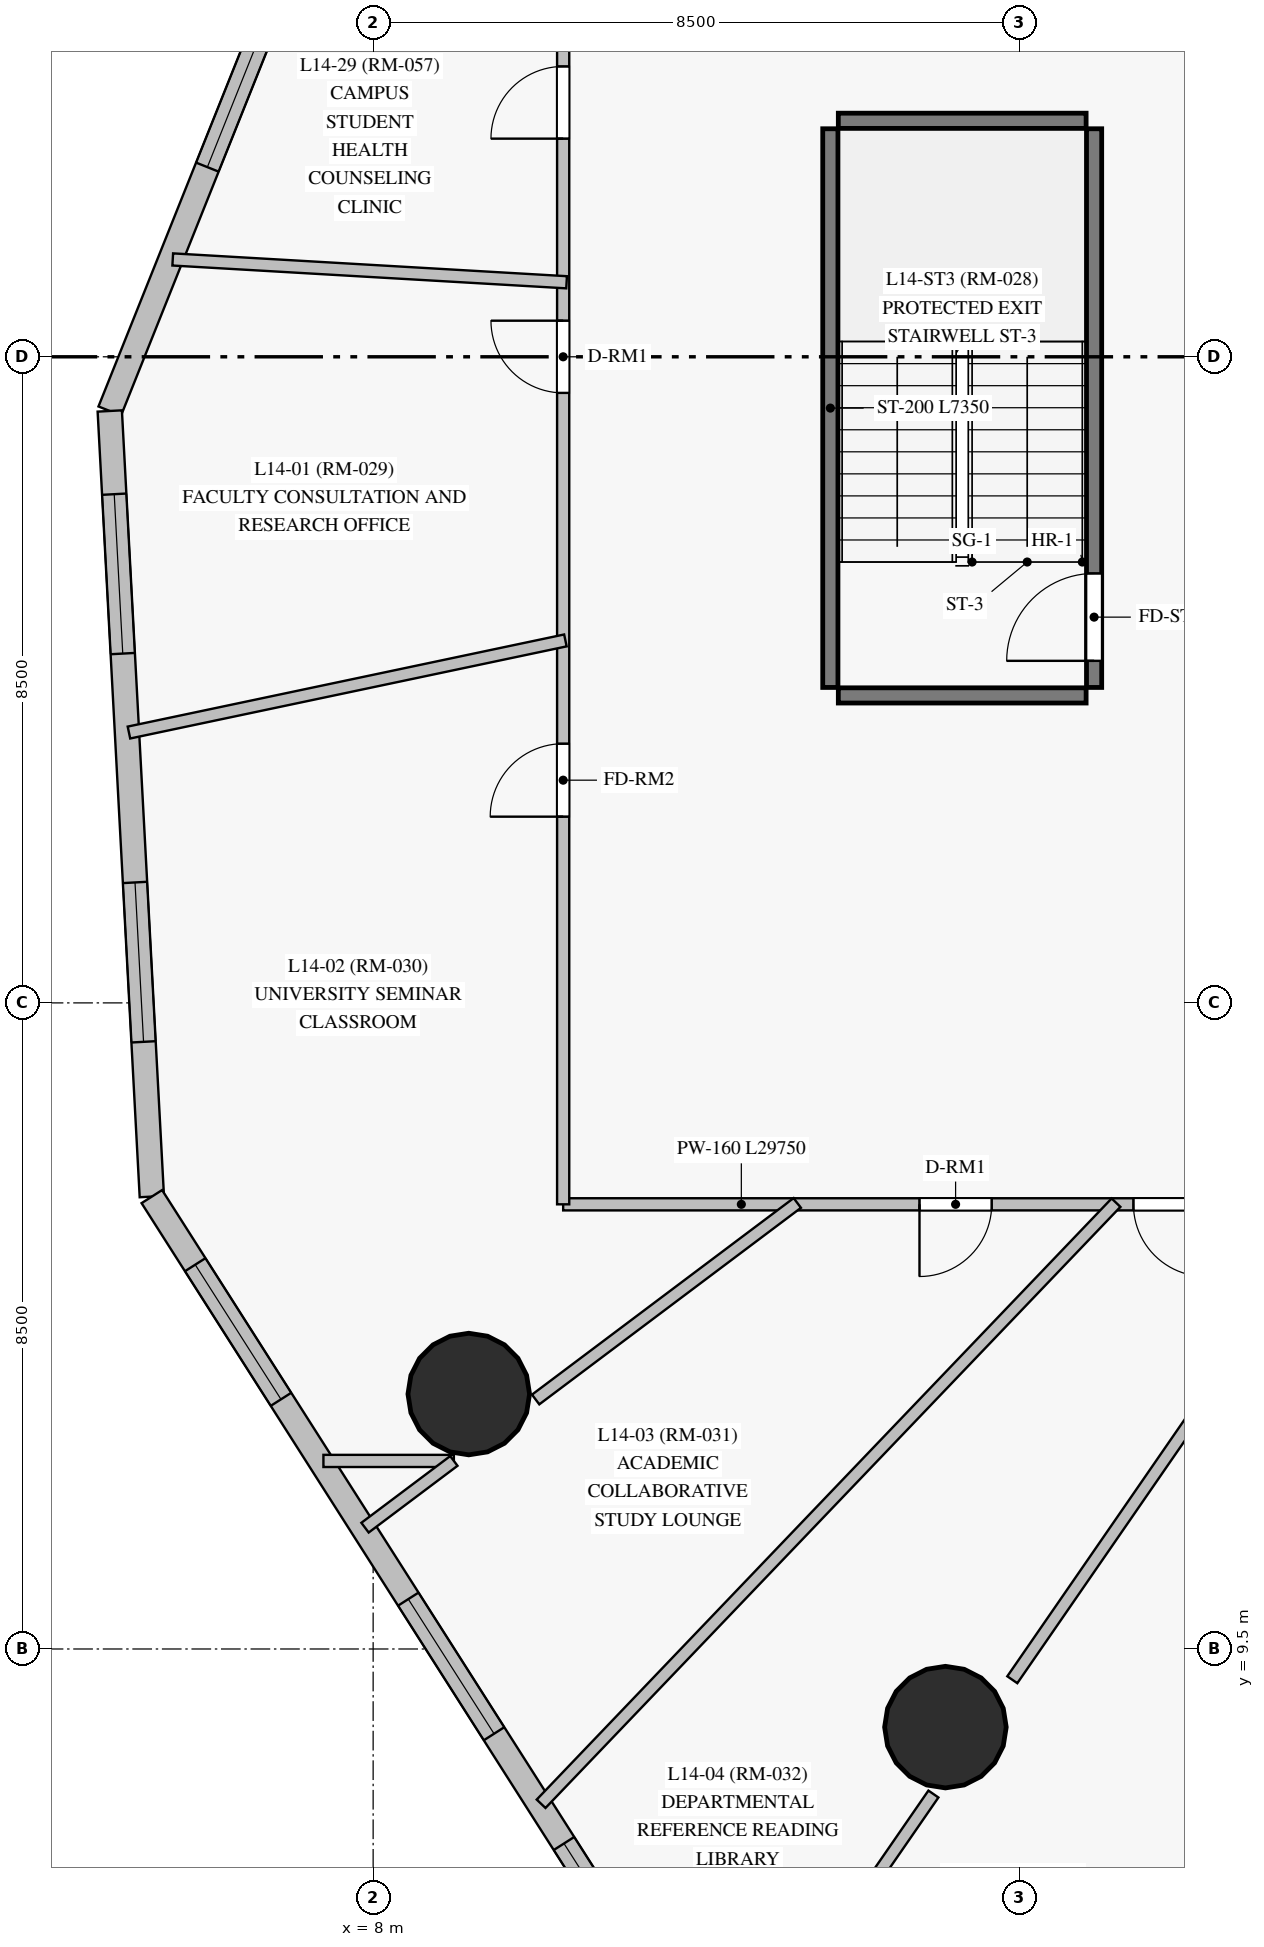
"""IFC4 building model, lengths in metres.
Left out: names, types, materials, properties, quantities, classifications, styles, units other than length and angle.
Written with IfcOpenShell. Run it as: python <this file> out.ifc"""

import sys

from ifc_helpers import new_model, si_unit, direction, frame, frame_2d, origin, origin_with_axes, origin_2d, place, context, subcontext, project, spatial, rectangle, circle, extrude, source, transform, mapped, element, fill, save


model = new_model("IFC4")
c1 = context("Model", 3, precision=1e-05, world=origin(), true_north=direction((0.0, 1.0)))
c2 = subcontext(c1, "Body", "Model", "MODEL_VIEW")
j1 = project(units=[si_unit("LENGTHUNIT", "METRE"), si_unit("PLANEANGLEUNIT", "RADIAN")], contexts=[c1])
p1 = place(None, origin())
s1 = spatial("IfcSite", under=j1, at=p1, CompositionType="ELEMENT")
p2 = place(p1, origin())
s2 = spatial("IfcBuilding", under=s1, at=p2, CompositionType="ELEMENT")
p3 = place(p2, frame((0.0, 0.0, 55.3)))
s3 = spatial("IfcBuildingStorey", under=s2, at=p3, CompositionType="ELEMENT", Elevation=55.3)
m1 = source(origin_with_axes(), c2, "Body", "SweptSolid", [
    extrude(circle(Radius=0.8, at=origin_2d()), origin(), (0.0, 0.0, 1.0), 3.6),
])
for number, where, z_axis, x_axis in (
    (1, (9.258, 12.854, 0.0), (0.0, 0.0, 1.0), (1.0, 0.0, 0.0)),
    (2, (15.529, 8.472, 0.0), (0.0, 0.0, 1.0), (1.0, 0.0, 0.0)),
):
    element("IfcColumn", number, at=place(p3, frame(where, z_axis=z_axis, x_axis=x_axis)), inside=s3, PredefinedType="COLUMN", context=c2, shape_type="MappedRepresentation", body=[
        mapped(m1, transform((0.0, 0.0, 0.0), scale=1.0)),
    ])
p4 = place(p3, frame((10.118, 39.736, 0.0), z_axis=(0.0, 0.0, 1.0), x_axis=(-0.371586779143, -0.928398225745, 0.0)))
e3 = element("IfcWall", 3, at=p4, inside=s3, PredefinedType="SOLIDWALL", context=c2, shape_type="SweptSolid", body=[
    extrude(rectangle(XDim=15.025, YDim=0.32, at=frame_2d((7.512, 0.0))), origin(), (0.0, 0.0, 1.0), 3.35),
])
p5 = place(p4, frame((1.056, 0.0, 0.85)))
e4 = element("IfcOpeningElement", 4, at=p5, cuts=e3, PredefinedType="OPENING", context=c2, shape_type="SweptSolid", body=[
    extrude(rectangle(XDim=2.1, YDim=1.95, at=frame_2d((1.05, 0.975))), frame((0.0, 0.17, 0.0), z_axis=(0.0, -1.0, 0.0), x_axis=(1.0, 0.0, 0.0)), (0.0, 0.0, 1.0), 0.34),
])
p6 = place(p4, frame((5.438, 0.0, 0.85)))
e5 = element("IfcOpeningElement", 5, at=p6, cuts=e3, PredefinedType="OPENING", context=c2, shape_type="SweptSolid", body=[
    extrude(rectangle(XDim=2.1, YDim=1.95, at=frame_2d((1.05, 0.975))), frame((0.0, 0.17, 0.0), z_axis=(0.0, -1.0, 0.0), x_axis=(1.0, 0.0, 0.0)), (0.0, 0.0, 1.0), 0.34),
])
p7 = place(p4, frame((9.469, 0.0, 0.85)))
e6 = element("IfcOpeningElement", 6, at=p7, cuts=e3, PredefinedType="OPENING", context=c2, shape_type="SweptSolid", body=[
    extrude(rectangle(XDim=2.1, YDim=1.95, at=frame_2d((1.05, 0.975))), frame((0.0, 0.17, 0.0), z_axis=(0.0, -1.0, 0.0), x_axis=(1.0, 0.0, 0.0)), (0.0, 0.0, 1.0), 0.34),
])
p8 = place(p3, frame((4.535, 25.787, 0.0), z_axis=(0.0, 0.0, 1.0), x_axis=(0.053473721023, -0.998569257067, 0.0)))
e7 = element("IfcWall", 7, at=p8, inside=s3, PredefinedType="SOLIDWALL", context=c2, shape_type="SweptSolid", body=[
    extrude(rectangle(XDim=10.35, YDim=0.32, at=frame_2d((5.175, 0.0))), origin(), (0.0, 0.0, 1.0), 3.35),
])
p9 = place(p8, frame((1.096, 0.0, 0.85)))
e8 = element("IfcOpeningElement", 8, at=p9, cuts=e7, PredefinedType="OPENING", context=c2, shape_type="SweptSolid", body=[
    extrude(rectangle(XDim=2.1, YDim=1.95, at=frame_2d((1.05, 0.975))), frame((0.0, 0.17, 0.0), z_axis=(0.0, -1.0, 0.0), x_axis=(1.0, 0.0, 0.0)), (0.0, 0.0, 1.0), 0.34),
])
p10 = place(p8, frame((6.211, 0.0, 0.85)))
e9 = element("IfcOpeningElement", 9, at=p10, cuts=e7, PredefinedType="OPENING", context=c2, shape_type="SweptSolid", body=[
    extrude(rectangle(XDim=2.1, YDim=1.95, at=frame_2d((1.05, 0.975))), frame((0.0, 0.17, 0.0), z_axis=(0.0, -1.0, 0.0), x_axis=(1.0, 0.0, 0.0)), (0.0, 0.0, 1.0), 0.34),
])
p11 = place(p3, frame((5.088, 15.452, 0.0), z_axis=(0.0, 0.0, 1.0), x_axis=(0.5373310839, -0.843371392848, 0.0)))
e10 = element("IfcWall", 10, at=p11, inside=s3, PredefinedType="SOLIDWALL", context=c2, shape_type="SweptSolid", body=[
    extrude(rectangle(XDim=12.862, YDim=0.32, at=frame_2d((6.431, 0.0))), origin(), (0.0, 0.0, 1.0), 3.35),
])
p12 = place(p11, frame((1.062, 0.0, 0.85)))
e11 = element("IfcOpeningElement", 11, at=p12, cuts=e10, PredefinedType="OPENING", context=c2, shape_type="SweptSolid", body=[
    extrude(rectangle(XDim=2.1, YDim=1.95, at=frame_2d((1.05, 0.975))), frame((0.0, 0.17, 0.0), z_axis=(0.0, -1.0, 0.0), x_axis=(1.0, 0.0, 0.0)), (0.0, 0.0, 1.0), 0.34),
])
p13 = place(p11, frame((6.279, 0.0, 0.85)))
e12 = element("IfcOpeningElement", 12, at=p13, cuts=e10, PredefinedType="OPENING", context=c2, shape_type="SweptSolid", body=[
    extrude(rectangle(XDim=2.1, YDim=1.95, at=frame_2d((1.05, 0.975))), frame((0.0, 0.17, 0.0), z_axis=(0.0, -1.0, 0.0), x_axis=(1.0, 0.0, 0.0)), (0.0, 0.0, 1.0), 0.34),
])
p14 = place(p11, frame((10.091, 0.0, 0.85)))
e13 = element("IfcOpeningElement", 13, at=p14, cuts=e10, PredefinedType="OPENING", context=c2, shape_type="SweptSolid", body=[
    extrude(rectangle(XDim=2.1, YDim=1.95, at=frame_2d((1.05, 0.975))), frame((0.0, 0.17, 0.0), z_axis=(0.0, -1.0, 0.0), x_axis=(1.0, 0.0, 0.0)), (0.0, 0.0, 1.0), 0.34),
])
p15 = place(p3, frame((14.015, 22.15, 0.0), z_axis=(0.0, 0.0, 1.0), x_axis=(0.0, 1.0, 0.0)))
e14 = element("IfcWall", 14, at=p15, inside=s3, PredefinedType="SHEAR", context=c2, shape_type="SweptSolid", body=[
    extrude(rectangle(XDim=7.35, YDim=0.2, at=frame_2d((3.675, 0.0))), origin(), (0.0, 0.0, 1.0), 3.35),
])
p16 = place(p3, frame((17.485, 22.15, 0.0), z_axis=(0.0, 0.0, 1.0), x_axis=(0.0, 1.0, 0.0)))
e15 = element("IfcWall", 15, at=p16, inside=s3, PredefinedType="SHEAR", context=c2, shape_type="SweptSolid", body=[
    extrude(rectangle(XDim=7.35, YDim=0.2, at=frame_2d((3.675, 0.0))), origin(), (0.0, 0.0, 1.0), 3.35),
])
p17 = place(p16, frame((0.35, 0.0, 0.0)))
e16 = element("IfcOpeningElement", 16, at=p17, cuts=e15, PredefinedType="OPENING", context=c2, shape_type="SweptSolid", body=[
    extrude(rectangle(XDim=1.15, YDim=2.15, at=frame_2d((0.575, 1.075))), frame((0.0, 0.11, 0.0), z_axis=(0.0, -1.0, 0.0), x_axis=(1.0, 0.0, 0.0)), (0.0, 0.0, 1.0), 0.22),
])
for number, where, z_axis, x_axis in (
    (17, (14.12, 22.045, 0.0), (0.0, 0.0, 1.0), (1.0, 0.0, 0.0)),
    (18, (14.12, 29.605, 0.0), (0.0, 0.0, 1.0), (1.0, 0.0, 0.0)),
):
    element("IfcWall", number, at=place(p3, frame(where, z_axis=z_axis, x_axis=x_axis)), inside=s3, PredefinedType="SHEAR", context=c2, shape_type="SweptSolid", body=[
        extrude(rectangle(XDim=3.26, YDim=0.2, at=frame_2d((1.63, 0.0))), origin(), (0.0, 0.0, 1.0), 3.35),
    ])
p18 = place(p3, frame((40.25, 15.35, 0.0), z_axis=(0.0, 0.0, 1.0), x_axis=(-1.0, 0.0, 0.0)))
e19 = element("IfcWall", 19, at=p18, inside=s3, PredefinedType="PARTITIONING", context=c2, shape_type="SweptSolid", body=[
    extrude(rectangle(XDim=29.75, YDim=0.16, at=frame_2d((14.875, 0.0))), origin(), (0.0, 0.0, 1.0), 2.7),
])
p19 = place(p18, frame((24.112, 0.0, 0.0)))
e20 = element("IfcOpeningElement", 20, at=p19, cuts=e19, PredefinedType="OPENING", context=c2, shape_type="SweptSolid", body=[
    extrude(rectangle(XDim=0.95, YDim=2.15, at=frame_2d((0.475, 1.075))), frame((0.0, 0.09, 0.0), z_axis=(0.0, -1.0, 0.0), x_axis=(1.0, 0.0, 0.0)), (0.0, 0.0, 1.0), 0.18),
])
p20 = place(p18, frame((21.298, 0.0, 0.0)))
e21 = element("IfcOpeningElement", 21, at=p20, cuts=e19, PredefinedType="OPENING", context=c2, shape_type="SweptSolid", body=[
    extrude(rectangle(XDim=0.95, YDim=2.15, at=frame_2d((0.475, 1.075))), frame((0.0, 0.09, 0.0), z_axis=(0.0, -1.0, 0.0), x_axis=(1.0, 0.0, 0.0)), (0.0, 0.0, 1.0), 0.18),
])
p21 = place(p18, frame((18.323, 0.0, 0.0)))
e22 = element("IfcOpeningElement", 22, at=p21, cuts=e19, PredefinedType="OPENING", context=c2, shape_type="SweptSolid", body=[
    extrude(rectangle(XDim=0.95, YDim=2.15, at=frame_2d((0.475, 1.075))), frame((0.0, 0.09, 0.0), z_axis=(0.0, -1.0, 0.0), x_axis=(1.0, 0.0, 0.0)), (0.0, 0.0, 1.0), 0.18),
])
p22 = place(p18, frame((15.556, 0.0, 0.0)))
e23 = element("IfcOpeningElement", 23, at=p22, cuts=e19, PredefinedType="OPENING", context=c2, shape_type="SweptSolid", body=[
    extrude(rectangle(XDim=0.95, YDim=2.15, at=frame_2d((0.475, 1.075))), frame((0.0, 0.09, 0.0), z_axis=(0.0, -1.0, 0.0), x_axis=(1.0, 0.0, 0.0)), (0.0, 0.0, 1.0), 0.18),
])
p23 = place(p18, frame((13.81, 0.0, 0.0)))
e24 = element("IfcOpeningElement", 24, at=p23, cuts=e19, PredefinedType="OPENING", context=c2, shape_type="SweptSolid", body=[
    extrude(rectangle(XDim=0.95, YDim=2.15, at=frame_2d((0.475, 1.075))), frame((0.0, 0.09, 0.0), z_axis=(0.0, -1.0, 0.0), x_axis=(1.0, 0.0, 0.0)), (0.0, 0.0, 1.0), 0.18),
])
p24 = place(p18, frame((10.377, 0.0, 0.0)))
e25 = element("IfcOpeningElement", 25, at=p24, cuts=e19, PredefinedType="OPENING", context=c2, shape_type="SweptSolid", body=[
    extrude(rectangle(XDim=0.95, YDim=2.15, at=frame_2d((0.475, 1.075))), frame((0.0, 0.09, 0.0), z_axis=(0.0, -1.0, 0.0), x_axis=(1.0, 0.0, 0.0)), (0.0, 0.0, 1.0), 0.18),
])
p25 = place(p18, frame((6.962, 0.0, 0.0)))
e26 = element("IfcOpeningElement", 26, at=p25, cuts=e19, PredefinedType="OPENING", context=c2, shape_type="SweptSolid", body=[
    extrude(rectangle(XDim=0.95, YDim=2.15, at=frame_2d((0.475, 1.075))), frame((0.0, 0.09, 0.0), z_axis=(0.0, -1.0, 0.0), x_axis=(1.0, 0.0, 0.0)), (0.0, 0.0, 1.0), 0.18),
])
p26 = place(p18, frame((2.425, 0.0, 0.0)))
e27 = element("IfcOpeningElement", 27, at=p26, cuts=e19, PredefinedType="OPENING", context=c2, shape_type="SweptSolid", body=[
    extrude(rectangle(XDim=0.95, YDim=2.15, at=frame_2d((0.475, 1.075))), frame((0.0, 0.09, 0.0), z_axis=(0.0, -1.0, 0.0), x_axis=(1.0, 0.0, 0.0)), (0.0, 0.0, 1.0), 0.18),
])
p27 = place(p3, frame((10.5, 15.35, 0.0), z_axis=(0.0, 0.0, 1.0), x_axis=(0.0, 1.0, 0.0)))
e28 = element("IfcWall", 28, at=p27, inside=s3, PredefinedType="PARTITIONING", context=c2, shape_type="SweptSolid", body=[
    extrude(rectangle(XDim=22.3, YDim=0.16, at=frame_2d((11.15, 0.0))), origin(), (0.0, 0.0, 1.0), 2.75),
])
p28 = place(p27, frame((10.675, 0.0, 0.0)))
e29 = element("IfcOpeningElement", 29, at=p28, cuts=e28, PredefinedType="OPENING", context=c2, shape_type="SweptSolid", body=[
    extrude(rectangle(XDim=0.95, YDim=2.15, at=frame_2d((0.475, 1.075))), frame((0.0, 0.09, 0.0), z_axis=(0.0, -1.0, 0.0), x_axis=(1.0, 0.0, 0.0)), (0.0, 0.0, 1.0), 0.18),
])
p29 = place(p27, frame((5.1, 0.0, 0.0)))
e30 = element("IfcOpeningElement", 30, at=p29, cuts=e28, PredefinedType="OPENING", context=c2, shape_type="SweptSolid", body=[
    extrude(rectangle(XDim=0.96, YDim=2.15, at=frame_2d((0.48, 1.075))), frame((0.0, 0.09, 0.0), z_axis=(0.0, -1.0, 0.0), x_axis=(1.0, 0.0, 0.0)), (0.0, 0.0, 1.0), 0.18),
])
p30 = place(p27, frame((14.02, 0.0, 0.0)))
e31 = element("IfcOpeningElement", 31, at=p30, cuts=e28, PredefinedType="OPENING", context=c2, shape_type="SweptSolid", body=[
    extrude(rectangle(XDim=0.95, YDim=2.15, at=frame_2d((0.475, 1.075))), frame((0.0, 0.09, 0.0), z_axis=(0.0, -1.0, 0.0), x_axis=(1.0, 0.0, 0.0)), (0.0, 0.0, 1.0), 0.18),
])
p31 = place(p3, frame((23.138, 15.377, 0.0), z_axis=(0.0, 0.0, 1.0), x_axis=(-0.429883158036, -0.902884527743, 0.0)))
e32 = element("IfcWall", 32, at=p31, inside=s3, PredefinedType="PARTITIONING", context=c2, shape_type="SweptSolid", body=[
    extrude(rectangle(XDim=13.532, YDim=0.16, at=frame_2d((6.766, 0.0))), origin(), (0.0, 0.0, 1.0), 3.35),
])
p32 = place(p3, frame((17.773, 15.372, 0.0), z_axis=(0.0, 0.0, 1.0), x_axis=(-0.691191745844, -0.722671412523, 0.0)))
e33 = element("IfcWall", 33, at=p32, inside=s3, PredefinedType="PARTITIONING", context=c2, shape_type="SweptSolid", body=[
    extrude(rectangle(XDim=10.943, YDim=0.16, at=frame_2d((5.472, 0.0))), origin(), (0.0, 0.0, 1.0), 2.7),
])
p33 = place(p3, frame((20.745, 15.375, 0.0), z_axis=(0.0, 0.0, 1.0), x_axis=(-0.568218054663, -0.822878023984, 0.0)))
e34 = element("IfcWall", 34, at=p33, inside=s3, PredefinedType="PARTITIONING", context=c2, shape_type="SweptSolid", body=[
    extrude(rectangle(XDim=7.631, YDim=0.16, at=frame_2d((3.815, 0.0))), origin(), (0.0, 0.0, 1.0), 2.7),
])
p34 = place(p3, frame((10.529, 22.769, 0.0), z_axis=(0.0, 0.0, 1.0), x_axis=(-0.978443718799, -0.206513653647, 0.0)))
e35 = element("IfcWall", 35, at=p34, inside=s3, PredefinedType="PARTITIONING", context=c2, shape_type="SweptSolid", body=[
    extrude(rectangle(XDim=5.868, YDim=0.16, at=frame_2d((2.934, 0.0))), origin(), (0.0, 0.0, 1.0), 3.35),
])
p35 = place(p3, frame((5.364, 27.781, 0.0), z_axis=(0.0, 0.0, 1.0), x_axis=(0.99832492802, -0.057856184577, 0.0)))
e36 = element("IfcWall", 36, at=p35, inside=s3, PredefinedType="PARTITIONING", context=c2, shape_type="SweptSolid", body=[
    extrude(rectangle(XDim=5.19, YDim=0.16, at=frame_2d((2.595, 0.0))), origin(), (0.0, 0.0, 1.0), 3.35),
])
p36 = place(p3, frame((13.58, 15.368, 0.0), z_axis=(0.0, 0.0, 1.0), x_axis=(-0.799564281906, -0.600580518416, 0.0)))
e37 = element("IfcWall", 37, at=p36, inside=s3, PredefinedType="PARTITIONING", context=c2, shape_type="SweptSolid", body=[
    extrude(rectangle(XDim=4.305, YDim=0.16, at=frame_2d((2.153, 0.0))), origin(), (0.0, 0.0, 1.0), 2.7),
])
p37 = place(p3, frame((15.371, 7.592, 0.0), z_axis=(0.0, 0.0, 1.0), x_axis=(-0.568221452797, -0.822875677476, 0.0)))
e38 = element("IfcWall", 38, at=p37, inside=s3, PredefinedType="PARTITIONING", context=c2, shape_type="SweptSolid", body=[
    extrude(rectangle(XDim=3.97, YDim=0.16, at=frame_2d((1.985, 0.0))), origin(), (0.0, 0.0, 1.0), 3.35),
])
p38 = place(p3, frame((7.346, 11.974, 0.0), z_axis=(0.0, 0.0, 1.0), x_axis=(1.0, 0.0, 0.0)))
e39 = element("IfcWall", 39, at=p38, inside=s3, PredefinedType="PARTITIONING", context=c2, shape_type="SweptSolid", body=[
    extrude(rectangle(XDim=1.716, YDim=0.16, at=frame_2d((0.858, 0.0))), origin(), (0.0, 0.0, 1.0), 3.35),
])
p39 = place(p3, frame((9.062, 11.974, 0.0), z_axis=(0.0, 0.0, 1.0), x_axis=(-0.799538780587, -0.600614467306, 0.0)))
e40 = element("IfcWall", 40, at=p39, inside=s3, PredefinedType="PARTITIONING", context=c2, shape_type="SweptSolid", body=[
    extrude(rectangle(XDim=1.462, YDim=0.16, at=frame_2d((0.731, 0.0))), origin(), (0.0, 0.0, 1.0), 3.35),
])
m2 = source(origin_with_axes(), c2, "Body", "SweptSolid", [
    extrude(rectangle(XDim=2.1, YDim=1.95, at=frame_2d((1.05, 0.975))), frame((0.0, 0.03, 0.0), z_axis=(0.0, -1.0, 0.0), x_axis=(1.0, 0.0, 0.0)), (0.0, 0.0, 1.0), 0.06),
])
p40 = place(p7, origin())
e41 = element("IfcWindow", 41, at=p40, inside=s3, PartitioningType="SINGLE_PANEL", PredefinedType="WINDOW", context=c2, shape_type="MappedRepresentation", body=[
    mapped(m2, transform((0.0, 0.0, 0.0), scale=1.0)),
])
fill(e6, e41)
p41 = place(p9, origin())
e42 = element("IfcWindow", 42, at=p41, inside=s3, PartitioningType="SINGLE_PANEL", PredefinedType="WINDOW", context=c2, shape_type="MappedRepresentation", body=[
    mapped(m2, transform((0.0, 0.0, 0.0), scale=1.0)),
])
fill(e8, e42)
p42 = place(p10, origin())
e43 = element("IfcWindow", 43, at=p42, inside=s3, PartitioningType="SINGLE_PANEL", PredefinedType="WINDOW", context=c2, shape_type="MappedRepresentation", body=[
    mapped(m2, transform((0.0, 0.0, 0.0), scale=1.0)),
])
fill(e9, e43)
p43 = place(p12, origin())
e44 = element("IfcWindow", 44, at=p43, inside=s3, PartitioningType="SINGLE_PANEL", PredefinedType="WINDOW", context=c2, shape_type="MappedRepresentation", body=[
    mapped(m2, transform((0.0, 0.0, 0.0), scale=1.0)),
])
fill(e11, e44)
p44 = place(p13, origin())
e45 = element("IfcWindow", 45, at=p44, inside=s3, PartitioningType="SINGLE_PANEL", PredefinedType="WINDOW", context=c2, shape_type="MappedRepresentation", body=[
    mapped(m2, transform((0.0, 0.0, 0.0), scale=1.0)),
])
fill(e12, e45)
p45 = place(p14, origin())
e46 = element("IfcWindow", 46, at=p45, inside=s3, PartitioningType="SINGLE_PANEL", PredefinedType="WINDOW", context=c2, shape_type="MappedRepresentation", body=[
    mapped(m2, transform((0.0, 0.0, 0.0), scale=1.0)),
])
fill(e13, e46)
m3 = source(origin_with_axes(), c2, "Body", "SweptSolid", [
    extrude(rectangle(XDim=1.15, YDim=2.15, at=frame_2d((0.575, 1.075))), frame((0.0, 0.025, 0.0), z_axis=(0.0, -1.0, 0.0), x_axis=(1.0, 0.0, 0.0)), (0.0, 0.0, 1.0), 0.05),
])
p46 = place(p17, origin())
e47 = element("IfcDoor", 47, at=p46, inside=s3, OperationType="SINGLE_SWING_LEFT", PredefinedType="DOOR", context=c2, shape_type="MappedRepresentation", body=[
    mapped(m3, transform((0.0, 0.0, 0.0), scale=1.0)),
])
fill(e16, e47)
m4 = source(origin_with_axes(), c2, "Body", "SweptSolid", [
    extrude(rectangle(XDim=0.95, YDim=2.15, at=frame_2d((0.475, 1.075))), frame((0.0, 0.025, 0.0), z_axis=(0.0, -1.0, 0.0), x_axis=(1.0, 0.0, 0.0)), (0.0, 0.0, 1.0), 0.05),
])
p47 = place(p28, origin())
e48 = element("IfcDoor", 48, at=p47, inside=s3, OperationType="SINGLE_SWING_RIGHT", PredefinedType="DOOR", context=c2, shape_type="MappedRepresentation", body=[
    mapped(m4, transform((0.0, 0.0, 0.0), scale=1.0)),
])
fill(e29, e48)
m5 = source(origin_with_axes(), c2, "Body", "SweptSolid", [
    extrude(rectangle(XDim=0.96, YDim=2.15, at=frame_2d((0.48, 1.075))), frame((0.0, 0.025, 0.0), z_axis=(0.0, -1.0, 0.0), x_axis=(1.0, 0.0, 0.0)), (0.0, 0.0, 1.0), 0.05),
])
p48 = place(p29, origin())
e49 = element("IfcDoor", 49, at=p48, inside=s3, OperationType="SINGLE_SWING_LEFT", PredefinedType="DOOR", context=c2, shape_type="MappedRepresentation", body=[
    mapped(m5, transform((0.0, 0.0, 0.0), scale=1.0)),
])
fill(e30, e49)
p49 = place(p19, origin())
e50 = element("IfcDoor", 50, at=p49, inside=s3, OperationType="SINGLE_SWING_RIGHT", PredefinedType="DOOR", context=c2, shape_type="MappedRepresentation", body=[
    mapped(m4, transform((0.0, 0.0, 0.0), scale=1.0)),
])
fill(e20, e50)
p50 = place(p20, origin())
e51 = element("IfcDoor", 51, at=p50, inside=s3, OperationType="SINGLE_SWING_LEFT", PredefinedType="DOOR", context=c2, shape_type="MappedRepresentation", body=[
    mapped(m4, transform((0.0, 0.0, 0.0), scale=1.0)),
])
fill(e21, e51)
p51 = place(p30, origin())
e52 = element("IfcDoor", 52, at=p51, inside=s3, OperationType="SINGLE_SWING_LEFT", PredefinedType="DOOR", context=c2, shape_type="MappedRepresentation", body=[
    mapped(m4, transform((0.0, 0.0, 0.0), scale=1.0)),
])
fill(e31, e52)
save(model, sys.argv[1])
